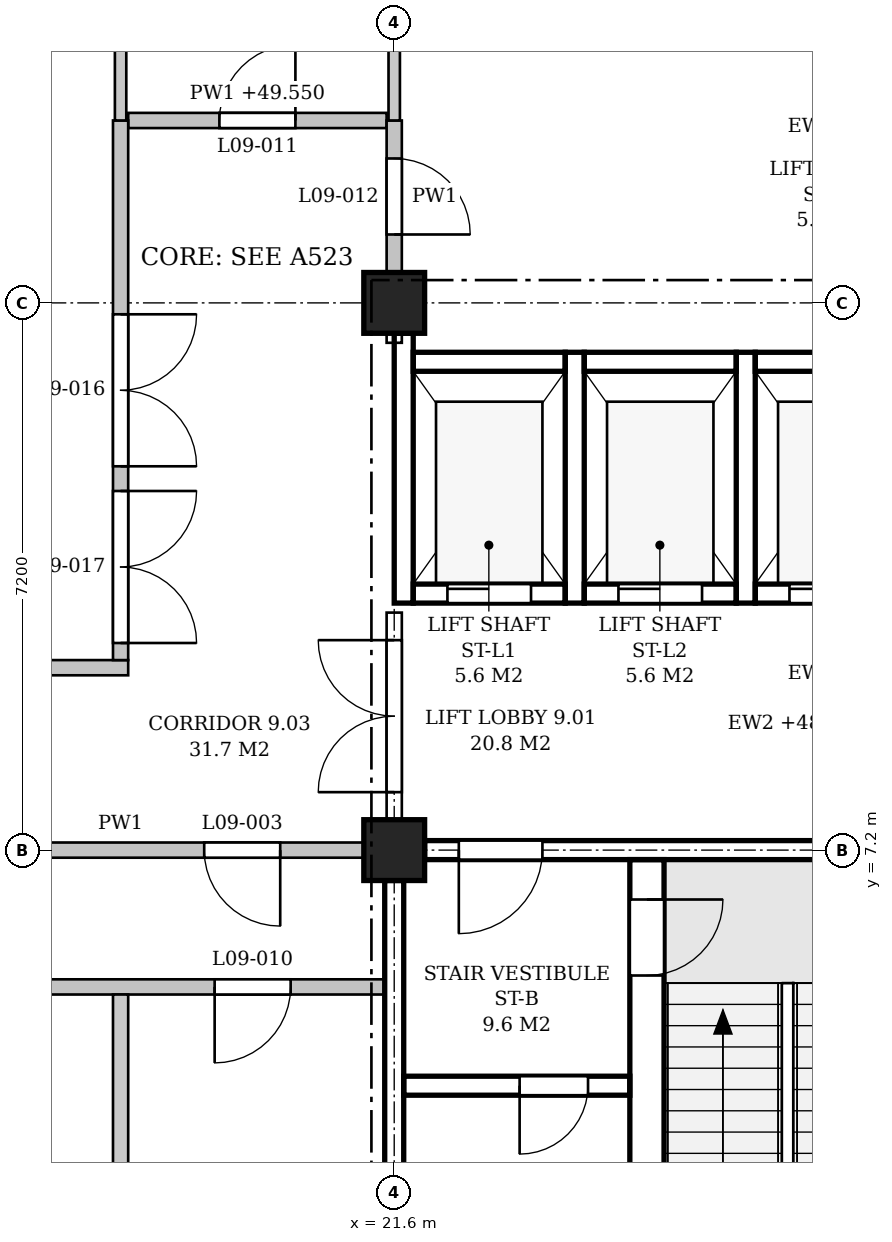
"""IFC4 building model, lengths in metres.
Left out: names, types, materials, properties, quantities, classifications, styles, units other than length and angle.
Written with IfcOpenShell. Run it as: python <this file> out.ifc"""

import sys

from ifc_helpers import new_model, si_unit, direction, frame, frame_2d, origin, origin_2d, place, context, subcontext, project, spatial, polyline, rectangle, outline, extrude, element, fill, save


model = new_model("IFC4")
c1 = context("Model", 3, precision=1e-05, world=origin(), true_north=direction((0.0, 1.0)))
c2 = subcontext(c1, "Body", "Model", "MODEL_VIEW")
j1 = project(units=[si_unit("LENGTHUNIT", "METRE"), si_unit("PLANEANGLEUNIT", "RADIAN")], contexts=[c1])
p1 = place(None, origin())
s1 = spatial("IfcSite", under=j1, at=p1, CompositionType="ELEMENT")
p2 = place(p1, origin())
s2 = spatial("IfcBuilding", under=s1, at=p2, CompositionType="ELEMENT")
p3 = place(p2, frame((0.0, 0.0, 45.3)))
s3 = spatial("IfcBuildingStorey", under=s2, at=p3, CompositionType="ELEMENT", Elevation=45.3)
for number, where, z_axis, x_axis in (
    (1, (21.6, 7.2, 0.0), (0.0, 0.0, 1.0), (1.0, 0.0, 0.0)),
    (2, (21.6, 14.4, 0.0), (0.0, 0.0, 1.0), (1.0, 0.0, 0.0)),
):
    element("IfcColumn", number, at=place(p3, frame(where, z_axis=z_axis, x_axis=x_axis)), inside=s3, PredefinedType="COLUMN", context=c2, shape_type="SweptSolid", body=[
        extrude(rectangle(XDim=0.8, YDim=0.8, at=origin_2d()), origin(), (0.0, 0.0, 1.0), 4.5),
    ])
p4 = place(p3, frame((22.0, 7.2, 0.0), z_axis=(0.0, 0.0, 1.0), x_axis=(1.0, 0.0, 0.0)))
e3 = element("IfcWall", 3, at=p4, inside=s3, PredefinedType="SHEAR", context=c2, shape_type="SweptSolid", body=[
    extrude(rectangle(XDim=6.4, YDim=0.25, at=frame_2d((3.2, 0.0))), origin(), (0.0, 0.0, 1.0), 3.55),
])
p5 = place(p4, frame((0.45, 0.0, 0.0)))
e4 = element("IfcOpeningElement", 4, at=p5, cuts=e3, PredefinedType="OPENING", context=c2, shape_type="SweptSolid", body=[
    extrude(rectangle(XDim=1.1, YDim=2.1, at=frame_2d((0.55, 1.05))), frame((0.0, 0.135, 0.0), z_axis=(0.0, -1.0, 0.0), x_axis=(1.0, 0.0, 0.0)), (0.0, 0.0, 1.0), 0.27),
])
p6 = place(p3, frame((21.6, 0.4, 0.0), z_axis=(0.0, 0.0, 1.0), x_axis=(0.0, 1.0, 0.0)))
e5 = element("IfcWall", 5, at=p6, inside=s3, PredefinedType="SHEAR", context=c2, shape_type="SweptSolid", body=[
    extrude(rectangle(XDim=6.4, YDim=0.25, at=frame_2d((3.2, 0.0))), origin(), (0.0, 0.0, 1.0), 3.55),
])
p7 = place(p3, frame((24.925, 0.15, 0.0), z_axis=(0.0, 0.0, 1.0), x_axis=(0.0, 1.0, 0.0)))
e6 = element("IfcWall", 6, at=p7, inside=s3, PredefinedType="SHEAR", context=c2, shape_type="SweptSolid", body=[
    extrude(rectangle(XDim=6.925, YDim=0.45, at=frame_2d((3.462, 0.0))), origin(), (0.0, 0.0, 1.0), 4.25),
])
p8 = place(p7, frame((5.4, 0.0, 0.0)))
e7 = element("IfcOpeningElement", 7, at=p8, cuts=e6, PredefinedType="OPENING", context=c2, shape_type="SweptSolid", body=[
    extrude(rectangle(XDim=1.0, YDim=2.1, at=frame_2d((0.5, 1.05))), frame((0.0, 0.235, 0.0), z_axis=(0.0, -1.0, 0.0), x_axis=(1.0, 0.0, 0.0)), (0.0, 0.0, 1.0), 0.47),
])
p9 = place(p3, frame((21.725, 4.1, 0.0), z_axis=(0.0, 0.0, 1.0), x_axis=(1.0, 0.0, 0.0)))
e8 = element("IfcWall", 8, at=p9, inside=s3, PredefinedType="SHEAR", context=c2, shape_type="SweptSolid", body=[
    extrude(rectangle(XDim=2.975, YDim=0.25, at=frame_2d((1.487, 0.0))), origin(), (0.0, 0.0, 1.0), 4.25),
])
p10 = place(p9, frame((1.525, 0.0, 0.0)))
e9 = element("IfcOpeningElement", 9, at=p10, cuts=e8, PredefinedType="OPENING", context=c2, shape_type="SweptSolid", body=[
    extrude(rectangle(XDim=0.9, YDim=2.1, at=frame_2d((0.45, 1.05))), frame((0.0, 0.135, 0.0), z_axis=(0.0, -1.0, 0.0), x_axis=(1.0, 0.0, 0.0)), (0.0, 0.0, 1.0), 0.27),
])
p11 = place(p3, frame((21.725, 10.45, -0.25), z_axis=(0.0, 0.0, 1.0), x_axis=(0.0, 1.0, 0.0)))
e10 = element("IfcWall", 10, at=p11, inside=s3, PredefinedType="SHEAR", context=c2, shape_type="SweptSolid", body=[
    extrude(rectangle(XDim=3.55, YDim=0.25, at=frame_2d((1.775, 0.0))), origin(), (0.0, 0.0, 1.0), 3.8),
])
for number, where, z_axis, x_axis in (
    (11, (23.975, 10.45, -0.25), (0.0, 0.0, 1.0), (0.0, 1.0, 0.0)),
    (12, (26.225, 10.45, -0.25), (0.0, 0.0, 1.0), (0.0, 1.0, 0.0)),
):
    element("IfcWall", number, at=place(p3, frame(where, z_axis=z_axis, x_axis=x_axis)), inside=s3, PredefinedType="SHEAR", context=c2, shape_type="SweptSolid", body=[
        extrude(rectangle(XDim=3.3, YDim=0.25, at=frame_2d((1.65, 0.0))), origin(), (0.0, 0.0, 1.0), 4.5),
    ])
p12 = place(p3, frame((21.85, 10.575, -0.25), z_axis=(0.0, 0.0, 1.0), x_axis=(1.0, 0.0, 0.0)))
e13 = element("IfcWall", 13, at=p12, inside=s3, PredefinedType="SHEAR", context=c2, shape_type="SweptSolid", body=[
    extrude(rectangle(XDim=2.0, YDim=0.25, at=frame_2d((1.0, 0.0))), origin(), (0.0, 0.0, 1.0), 4.5),
])
p13 = place(p12, frame((0.45, 0.0, 0.25)))
e14 = element("IfcOpeningElement", 14, at=p13, cuts=e13, PredefinedType="OPENING", context=c2, shape_type="SweptSolid", body=[
    extrude(rectangle(XDim=1.1, YDim=2.1, at=frame_2d((0.55, 1.05))), frame((0.0, 0.135, 0.0), z_axis=(0.0, -1.0, 0.0), x_axis=(1.0, 0.0, 0.0)), (0.0, 0.0, 1.0), 0.27),
])
p14 = place(p3, frame((21.85, 13.625, -0.25), z_axis=(0.0, 0.0, 1.0), x_axis=(1.0, 0.0, 0.0)))
e15 = element("IfcWall", 15, at=p14, inside=s3, PredefinedType="SHEAR", context=c2, shape_type="SweptSolid", body=[
    extrude(rectangle(XDim=2.0, YDim=0.25, at=frame_2d((1.0, 0.0))), origin(), (0.0, 0.0, 1.0), 4.5),
])
p15 = place(p3, frame((24.1, 10.575, -0.25), z_axis=(0.0, 0.0, 1.0), x_axis=(1.0, 0.0, 0.0)))
e16 = element("IfcWall", 16, at=p15, inside=s3, PredefinedType="SHEAR", context=c2, shape_type="SweptSolid", body=[
    extrude(rectangle(XDim=2.0, YDim=0.25, at=frame_2d((1.0, 0.0))), origin(), (0.0, 0.0, 1.0), 4.5),
])
p16 = place(p15, frame((0.45, 0.0, 0.25)))
e17 = element("IfcOpeningElement", 17, at=p16, cuts=e16, PredefinedType="OPENING", context=c2, shape_type="SweptSolid", body=[
    extrude(rectangle(XDim=1.1, YDim=2.1, at=frame_2d((0.55, 1.05))), frame((0.0, 0.135, 0.0), z_axis=(0.0, -1.0, 0.0), x_axis=(1.0, 0.0, 0.0)), (0.0, 0.0, 1.0), 0.27),
])
p17 = place(p3, frame((24.1, 13.625, -0.25), z_axis=(0.0, 0.0, 1.0), x_axis=(1.0, 0.0, 0.0)))
e18 = element("IfcWall", 18, at=p17, inside=s3, PredefinedType="SHEAR", context=c2, shape_type="SweptSolid", body=[
    extrude(rectangle(XDim=2.0, YDim=0.25, at=frame_2d((1.0, 0.0))), origin(), (0.0, 0.0, 1.0), 4.5),
])
p18 = place(p3, frame((26.35, 10.575, -0.25), z_axis=(0.0, 0.0, 1.0), x_axis=(1.0, 0.0, 0.0)))
e19 = element("IfcWall", 19, at=p18, inside=s3, PredefinedType="SHEAR", context=c2, shape_type="SweptSolid", body=[
    extrude(rectangle(XDim=2.0, YDim=0.25, at=frame_2d((1.0, 0.0))), origin(), (0.0, 0.0, 1.0), 4.5),
])
p19 = place(p18, frame((0.45, 0.0, 0.25)))
e20 = element("IfcOpeningElement", 20, at=p19, cuts=e19, PredefinedType="OPENING", context=c2, shape_type="SweptSolid", body=[
    extrude(rectangle(XDim=1.1, YDim=2.1, at=frame_2d((0.55, 1.05))), frame((0.0, 0.135, 0.0), z_axis=(0.0, -1.0, 0.0), x_axis=(1.0, 0.0, 0.0)), (0.0, 0.0, 1.0), 0.27),
])
p20 = place(p3, frame((26.35, 13.625, -0.25), z_axis=(0.0, 0.0, 1.0), x_axis=(1.0, 0.0, 0.0)))
e21 = element("IfcWall", 21, at=p20, inside=s3, PredefinedType="SHEAR", context=c2, shape_type="SweptSolid", body=[
    extrude(rectangle(XDim=2.0, YDim=0.25, at=frame_2d((1.0, 0.0))), origin(), (0.0, 0.0, 1.0), 4.5),
])
p21 = place(p3, frame((7.325, 5.4, 0.0), z_axis=(0.0, 0.0, 1.0), x_axis=(1.0, 0.0, 0.0)))
e22 = element("IfcWall", 22, at=p21, inside=s3, PredefinedType="PARTITIONING", context=c2, shape_type="SweptSolid", body=[
    extrude(outline(polyline([(0.0, 0.0), (14.15, 0.0), (14.15, 3.55), (14.05, 3.55), (14.05, 4.25), (7.3, 4.25), (7.3, 3.55), (6.85, 3.55), (6.85, 4.25), (0.1, 4.25), (0.1, 3.55), (0.0, 3.55), (0.0, 0.0)])), frame((0.0, 0.1, 0.0), z_axis=(0.0, -1.0, 0.0), x_axis=(1.0, 0.0, 0.0)), (0.0, 0.0, 1.0), 0.2),
])
p22 = place(p21, frame((1.238, 0.0, 0.0)))
e23 = element("IfcOpeningElement", 23, at=p22, cuts=e22, PredefinedType="OPENING", context=c2, shape_type="SweptSolid", body=[
    extrude(rectangle(XDim=1.0, YDim=2.1, at=frame_2d((0.5, 1.05))), frame((0.0, 0.11, 0.0), z_axis=(0.0, -1.0, 0.0), x_axis=(1.0, 0.0, 0.0)), (0.0, 0.0, 1.0), 0.22),
])
p23 = place(p21, frame((4.775, 0.0, 0.0)))
e24 = element("IfcOpeningElement", 24, at=p23, cuts=e22, PredefinedType="OPENING", context=c2, shape_type="SweptSolid", body=[
    extrude(rectangle(XDim=1.0, YDim=2.1, at=frame_2d((0.5, 1.05))), frame((0.0, 0.11, 0.0), z_axis=(0.0, -1.0, 0.0), x_axis=(1.0, 0.0, 0.0)), (0.0, 0.0, 1.0), 0.22),
])
p24 = place(p21, frame((8.375, 0.0, 0.0)))
e25 = element("IfcOpeningElement", 25, at=p24, cuts=e22, PredefinedType="OPENING", context=c2, shape_type="SweptSolid", body=[
    extrude(rectangle(XDim=1.0, YDim=2.1, at=frame_2d((0.5, 1.05))), frame((0.0, 0.11, 0.0), z_axis=(0.0, -1.0, 0.0), x_axis=(1.0, 0.0, 0.0)), (0.0, 0.0, 1.0), 0.22),
])
p25 = place(p21, frame((11.913, 0.0, 0.0)))
e26 = element("IfcOpeningElement", 26, at=p25, cuts=e22, PredefinedType="OPENING", context=c2, shape_type="SweptSolid", body=[
    extrude(rectangle(XDim=1.0, YDim=2.1, at=frame_2d((0.5, 1.05))), frame((0.0, 0.11, 0.0), z_axis=(0.0, -1.0, 0.0), x_axis=(1.0, 0.0, 0.0)), (0.0, 0.0, 1.0), 0.22),
])
p26 = place(p3, frame((14.8, 7.2, 0.0), z_axis=(0.0, 0.0, 1.0), x_axis=(1.0, 0.0, 0.0)))
e27 = element("IfcWall", 27, at=p26, inside=s3, PredefinedType="PARTITIONING", context=c2, shape_type="SweptSolid", body=[
    extrude(rectangle(XDim=6.4, YDim=0.2, at=frame_2d((3.2, 0.0))), origin(), (0.0, 0.0, 1.0), 3.55),
])
p27 = place(p26, frame((4.3, 0.0, 0.0)))
e28 = element("IfcOpeningElement", 28, at=p27, cuts=e27, PredefinedType="OPENING", context=c2, shape_type="SweptSolid", body=[
    extrude(rectangle(XDim=1.0, YDim=2.1, at=frame_2d((0.5, 1.05))), frame((0.0, 0.11, 0.0), z_axis=(0.0, -1.0, 0.0), x_axis=(1.0, 0.0, 0.0)), (0.0, 0.0, 1.0), 0.22),
])
p28 = place(p3, frame((3.5, 9.6, 0.0), z_axis=(0.0, 0.0, 1.0), x_axis=(1.0, 0.0, 0.0)))
e29 = element("IfcWall", 29, at=p28, inside=s3, PredefinedType="PARTITIONING", context=c2, shape_type="SweptSolid", body=[
    extrude(outline(polyline([(0.0, 0.0), (14.6, 0.0), (14.6, 4.25), (11.125, 4.25), (11.125, 3.55), (10.675, 3.55), (10.675, 4.25), (3.925, 4.25), (3.925, 3.55), (3.475, 3.55), (3.475, 4.25), (0.0, 4.25), (0.0, 0.0)])), frame((0.0, 0.1, 0.0), z_axis=(0.0, -1.0, 0.0), x_axis=(1.0, 0.0, 0.0)), (0.0, 0.0, 1.0), 0.2),
])
p29 = place(p28, frame((1.4, 0.0, 0.0)))
e30 = element("IfcOpeningElement", 30, at=p29, cuts=e29, PredefinedType="OPENING", context=c2, shape_type="SweptSolid", body=[
    extrude(rectangle(XDim=1.0, YDim=2.1, at=frame_2d((0.5, 1.05))), frame((0.0, 0.11, 0.0), z_axis=(0.0, -1.0, 0.0), x_axis=(1.0, 0.0, 0.0)), (0.0, 0.0, 1.0), 0.22),
])
p30 = place(p28, frame((5.0, 0.0, 0.0)))
e31 = element("IfcOpeningElement", 31, at=p30, cuts=e29, PredefinedType="OPENING", context=c2, shape_type="SweptSolid", body=[
    extrude(rectangle(XDim=1.0, YDim=2.1, at=frame_2d((0.5, 1.05))), frame((0.0, 0.11, 0.0), z_axis=(0.0, -1.0, 0.0), x_axis=(1.0, 0.0, 0.0)), (0.0, 0.0, 1.0), 0.22),
])
p31 = place(p3, frame((18.1, 16.8, 0.0), z_axis=(0.0, 0.0, 1.0), x_axis=(1.0, 0.0, 0.0)))
e32 = element("IfcWall", 32, at=p31, inside=s3, PredefinedType="PARTITIONING", context=c2, shape_type="SweptSolid", body=[
    extrude(outline(polyline([(0.0, 0.0), (3.4, 0.0), (3.4, 3.55), (3.275, 3.55), (3.275, 4.25), (0.0, 4.25), (0.0, 0.0)])), frame((0.0, 0.1, 0.0), z_axis=(0.0, -1.0, 0.0), x_axis=(1.0, 0.0, 0.0)), (0.0, 0.0, 1.0), 0.2),
])
p32 = place(p31, frame((1.2, 0.0, 0.0)))
e33 = element("IfcOpeningElement", 33, at=p32, cuts=e32, PredefinedType="OPENING", context=c2, shape_type="SweptSolid", body=[
    extrude(rectangle(XDim=1.0, YDim=2.1, at=frame_2d((0.5, 1.05))), frame((0.0, 0.11, 0.0), z_axis=(0.0, -1.0, 0.0), x_axis=(1.0, 0.0, 0.0)), (0.0, 0.0, 1.0), 0.22),
])
p33 = place(p3, frame((18.0, 0.15, 0.0), z_axis=(0.0, 0.0, 1.0), x_axis=(0.0, 1.0, 0.0)))
e34 = element("IfcWall", 34, at=p33, inside=s3, PredefinedType="PARTITIONING", context=c2, shape_type="SweptSolid", body=[
    extrude(outline(polyline([(0.0, 0.0), (5.15, 0.0), (5.15, 4.25), (0.05, 4.25), (0.05, 3.65), (0.0, 3.65), (0.0, 0.0)])), frame((0.0, 0.1, 0.0), z_axis=(0.0, -1.0, 0.0), x_axis=(1.0, 0.0, 0.0)), (0.0, 0.0, 1.0), 0.2),
])
p34 = place(p3, frame((18.0, 9.7, 0.0), z_axis=(0.0, 0.0, 1.0), x_axis=(0.0, 1.0, 0.0)))
e35 = element("IfcWall", 35, at=p34, inside=s3, PredefinedType="PARTITIONING", context=c2, shape_type="SweptSolid", body=[
    extrude(outline(polyline([(0.0, 0.0), (7.1, 0.0), (7.1, 4.25), (4.925, 4.25), (4.925, 3.55), (4.475, 3.55), (4.475, 4.25), (0.0, 4.25), (0.0, 0.0)])), frame((0.0, 0.1, 0.0), z_axis=(0.0, -1.0, 0.0), x_axis=(1.0, 0.0, 0.0)), (0.0, 0.0, 1.0), 0.2),
])
p35 = place(p34, frame((2.55, 0.0, 0.0)))
e36 = element("IfcOpeningElement", 36, at=p35, cuts=e35, PredefinedType="OPENING", context=c2, shape_type="SweptSolid", body=[
    extrude(rectangle(XDim=2.0, YDim=2.1, at=frame_2d((1.0, 1.05))), frame((0.0, 0.11, 0.0), z_axis=(0.0, -1.0, 0.0), x_axis=(1.0, 0.0, 0.0)), (0.0, 0.0, 1.0), 0.22),
])
p36 = place(p34, frame((0.225, 0.0, 0.0)))
e37 = element("IfcOpeningElement", 37, at=p36, cuts=e35, PredefinedType="OPENING", context=c2, shape_type="SweptSolid", body=[
    extrude(rectangle(XDim=2.0, YDim=2.1, at=frame_2d((1.0, 1.05))), frame((0.0, 0.11, 0.0), z_axis=(0.0, -1.0, 0.0), x_axis=(1.0, 0.0, 0.0)), (0.0, 0.0, 1.0), 0.22),
])
p37 = place(p3, frame((18.0, 16.8, 0.0), z_axis=(0.0, 0.0, 1.0), x_axis=(0.0, 1.0, 0.0)))
e38 = element("IfcWall", 38, at=p37, inside=s3, PredefinedType="PARTITIONING", context=c2, shape_type="SweptSolid", body=[
    extrude(rectangle(XDim=4.65, YDim=0.15, at=frame_2d((2.325, 0.0))), origin(), (0.0, 0.0, 1.0), 3.55),
])
p38 = place(p3, frame((21.6, 7.6, 0.0), z_axis=(0.0, 0.0, 1.0), x_axis=(0.0, 1.0, 0.0)))
e39 = element("IfcWall", 39, at=p38, inside=s3, PredefinedType="PARTITIONING", context=c2, shape_type="SweptSolid", body=[
    extrude(rectangle(XDim=2.725, YDim=0.2, at=frame_2d((1.362, 0.0))), origin(), (0.0, 0.0, 1.0), 3.55),
])
p39 = place(p38, frame((0.362, 0.0, 0.0)))
e40 = element("IfcOpeningElement", 40, at=p39, cuts=e39, PredefinedType="OPENING", context=c2, shape_type="SweptSolid", body=[
    extrude(rectangle(XDim=2.0, YDim=2.4, at=frame_2d((1.0, 1.2))), frame((0.0, 0.11, 0.0), z_axis=(0.0, -1.0, 0.0), x_axis=(1.0, 0.0, 0.0)), (0.0, 0.0, 1.0), 0.22),
])
p40 = place(p3, frame((21.6, 13.875, 0.0), z_axis=(0.0, 0.0, 1.0), x_axis=(0.0, 1.0, 0.0)))
e41 = element("IfcWall", 41, at=p40, inside=s3, PredefinedType="PARTITIONING", context=c2, shape_type="SweptSolid", body=[
    extrude(rectangle(XDim=0.125, YDim=0.2, at=frame_2d((0.062, 0.0))), origin(), (0.0, 0.0, 1.0), 3.55),
])
p41 = place(p3, frame((21.6, 14.8, 0.0), z_axis=(0.0, 0.0, 1.0), x_axis=(0.0, 1.0, 0.0)))
e42 = element("IfcWall", 42, at=p41, inside=s3, PredefinedType="PARTITIONING", context=c2, shape_type="SweptSolid", body=[
    extrude(rectangle(XDim=2.0, YDim=0.2, at=frame_2d((1.0, 0.0))), origin(), (0.0, 0.0, 1.0), 3.55),
])
p42 = place(p41, frame((0.5, 0.0, 0.0)))
e43 = element("IfcOpeningElement", 43, at=p42, cuts=e42, PredefinedType="OPENING", context=c2, shape_type="SweptSolid", body=[
    extrude(rectangle(XDim=1.0, YDim=2.1, at=frame_2d((0.5, 1.05))), frame((0.0, 0.11, 0.0), z_axis=(0.0, -1.0, 0.0), x_axis=(1.0, 0.0, 0.0)), (0.0, 0.0, 1.0), 0.22),
])
p43 = place(p3, frame((21.6, 16.8, 0.0), z_axis=(0.0, 0.0, 1.0), x_axis=(0.0, 1.0, 0.0)))
e44 = element("IfcWall", 44, at=p43, inside=s3, PredefinedType="PARTITIONING", context=c2, shape_type="SweptSolid", body=[
    extrude(rectangle(XDim=4.4, YDim=0.15, at=frame_2d((2.2, 0.0))), origin(), (0.0, 0.0, 1.0), 3.55),
])
p44 = place(p8, frame((1.0, 0.0, 0.0), z_axis=(0.0, 0.0, 1.0), x_axis=(-1.0, 0.0, 0.0)))
e45 = element("IfcDoor", 45, at=p44, inside=s3, OperationType="SINGLE_SWING_LEFT", PredefinedType="DOOR", context=c2, shape_type="SweptSolid", body=[
    extrude(rectangle(XDim=1.0, YDim=2.1, at=frame_2d((0.5, 1.05))), frame((0.0, 0.025, 0.0), z_axis=(0.0, -1.0, 0.0), x_axis=(1.0, 0.0, 0.0)), (0.0, 0.0, 1.0), 0.05),
])
fill(e7, e45)
p45 = place(p5, frame((1.1, 0.0, 0.0), z_axis=(0.0, 0.0, 1.0), x_axis=(-1.0, 0.0, 0.0)))
e46 = element("IfcDoor", 46, at=p45, inside=s3, OperationType="SINGLE_SWING_RIGHT", PredefinedType="DOOR", context=c2, shape_type="SweptSolid", body=[
    extrude(rectangle(XDim=1.1, YDim=2.1, at=frame_2d((0.55, 1.05))), frame((0.0, 0.025, 0.0), z_axis=(0.0, -1.0, 0.0), x_axis=(1.0, 0.0, 0.0)), (0.0, 0.0, 1.0), 0.05),
])
fill(e4, e46)
p46 = place(p10, frame((0.9, 0.0, 0.0), z_axis=(0.0, 0.0, 1.0), x_axis=(-1.0, 0.0, 0.0)))
e47 = element("IfcDoor", 47, at=p46, inside=s3, OperationType="SINGLE_SWING_RIGHT", PredefinedType="DOOR", context=c2, shape_type="SweptSolid", body=[
    extrude(rectangle(XDim=0.9, YDim=2.1, at=frame_2d((0.45, 1.05))), frame((0.0, 0.025, 0.0), z_axis=(0.0, -1.0, 0.0), x_axis=(1.0, 0.0, 0.0)), (0.0, 0.0, 1.0), 0.05),
])
fill(e9, e47)
p47 = place(p13, origin())
e48 = element("IfcDoor", 48, at=p47, inside=s3, OperationType="SLIDING_TO_LEFT", PredefinedType="DOOR", context=c2, shape_type="SweptSolid", body=[
    extrude(rectangle(XDim=1.1, YDim=2.1, at=frame_2d((0.55, 1.05))), frame((0.0, 0.025, 0.0), z_axis=(0.0, -1.0, 0.0), x_axis=(1.0, 0.0, 0.0)), (0.0, 0.0, 1.0), 0.05),
])
fill(e14, e48)
p48 = place(p16, origin())
e49 = element("IfcDoor", 49, at=p48, inside=s3, OperationType="SLIDING_TO_LEFT", PredefinedType="DOOR", context=c2, shape_type="SweptSolid", body=[
    extrude(rectangle(XDim=1.1, YDim=2.1, at=frame_2d((0.55, 1.05))), frame((0.0, 0.025, 0.0), z_axis=(0.0, -1.0, 0.0), x_axis=(1.0, 0.0, 0.0)), (0.0, 0.0, 1.0), 0.05),
])
fill(e17, e49)
p49 = place(p19, origin())
e50 = element("IfcDoor", 50, at=p49, inside=s3, OperationType="SLIDING_TO_LEFT", PredefinedType="DOOR", context=c2, shape_type="SweptSolid", body=[
    extrude(rectangle(XDim=1.1, YDim=2.1, at=frame_2d((0.55, 1.05))), frame((0.0, 0.025, 0.0), z_axis=(0.0, -1.0, 0.0), x_axis=(1.0, 0.0, 0.0)), (0.0, 0.0, 1.0), 0.05),
])
fill(e20, e50)
p50 = place(p39, origin())
e51 = element("IfcDoor", 51, at=p50, inside=s3, OperationType="DOUBLE_DOOR_SINGLE_SWING", PredefinedType="DOOR", context=c2, shape_type="SweptSolid", body=[
    extrude(rectangle(XDim=2.0, YDim=2.4, at=frame_2d((1.0, 1.2))), frame((0.0, 0.025, 0.0), z_axis=(0.0, -1.0, 0.0), x_axis=(1.0, 0.0, 0.0)), (0.0, 0.0, 1.0), 0.05),
])
fill(e40, e51)
p51 = place(p27, frame((1.0, 0.0, 0.0), z_axis=(0.0, 0.0, 1.0), x_axis=(-1.0, 0.0, 0.0)))
e52 = element("IfcDoor", 52, at=p51, inside=s3, OperationType="SINGLE_SWING_LEFT", PredefinedType="DOOR", context=c2, shape_type="SweptSolid", body=[
    extrude(rectangle(XDim=1.0, YDim=2.1, at=frame_2d((0.5, 1.05))), frame((0.0, 0.025, 0.0), z_axis=(0.0, -1.0, 0.0), x_axis=(1.0, 0.0, 0.0)), (0.0, 0.0, 1.0), 0.05),
])
fill(e28, e52)
p52 = place(p25, frame((1.0, 0.0, 0.0), z_axis=(0.0, 0.0, 1.0), x_axis=(-1.0, 0.0, 0.0)))
e53 = element("IfcDoor", 53, at=p52, inside=s3, OperationType="SINGLE_SWING_RIGHT", PredefinedType="DOOR", context=c2, shape_type="SweptSolid", body=[
    extrude(rectangle(XDim=1.0, YDim=2.1, at=frame_2d((0.5, 1.05))), frame((0.0, 0.025, 0.0), z_axis=(0.0, -1.0, 0.0), x_axis=(1.0, 0.0, 0.0)), (0.0, 0.0, 1.0), 0.05),
])
fill(e26, e53)
p53 = place(p32, origin())
e54 = element("IfcDoor", 54, at=p53, inside=s3, OperationType="SINGLE_SWING_RIGHT", PredefinedType="DOOR", context=c2, shape_type="SweptSolid", body=[
    extrude(rectangle(XDim=1.0, YDim=2.1, at=frame_2d((0.5, 1.05))), frame((0.0, 0.025, 0.0), z_axis=(0.0, -1.0, 0.0), x_axis=(1.0, 0.0, 0.0)), (0.0, 0.0, 1.0), 0.05),
])
fill(e33, e54)
p54 = place(p42, frame((1.0, 0.0, 0.0), z_axis=(0.0, 0.0, 1.0), x_axis=(-1.0, 0.0, 0.0)))
e55 = element("IfcDoor", 55, at=p54, inside=s3, OperationType="SINGLE_SWING_RIGHT", PredefinedType="DOOR", context=c2, shape_type="SweptSolid", body=[
    extrude(rectangle(XDim=1.0, YDim=2.1, at=frame_2d((0.5, 1.05))), frame((0.0, 0.025, 0.0), z_axis=(0.0, -1.0, 0.0), x_axis=(1.0, 0.0, 0.0)), (0.0, 0.0, 1.0), 0.05),
])
fill(e43, e55)
p55 = place(p35, origin())
e56 = element("IfcDoor", 56, at=p55, inside=s3, OperationType="DOUBLE_DOOR_SINGLE_SWING", PredefinedType="DOOR", context=c2, shape_type="SweptSolid", body=[
    extrude(rectangle(XDim=2.0, YDim=2.1, at=frame_2d((1.0, 1.05))), frame((0.0, 0.025, 0.0), z_axis=(0.0, -1.0, 0.0), x_axis=(1.0, 0.0, 0.0)), (0.0, 0.0, 1.0), 0.05),
])
fill(e36, e56)
p56 = place(p36, origin())
e57 = element("IfcDoor", 57, at=p56, inside=s3, OperationType="DOUBLE_DOOR_SINGLE_SWING", PredefinedType="DOOR", context=c2, shape_type="SweptSolid", body=[
    extrude(rectangle(XDim=2.0, YDim=2.1, at=frame_2d((1.0, 1.05))), frame((0.0, 0.025, 0.0), z_axis=(0.0, -1.0, 0.0), x_axis=(1.0, 0.0, 0.0)), (0.0, 0.0, 1.0), 0.05),
])
fill(e37, e57)
save(model, sys.argv[1])
